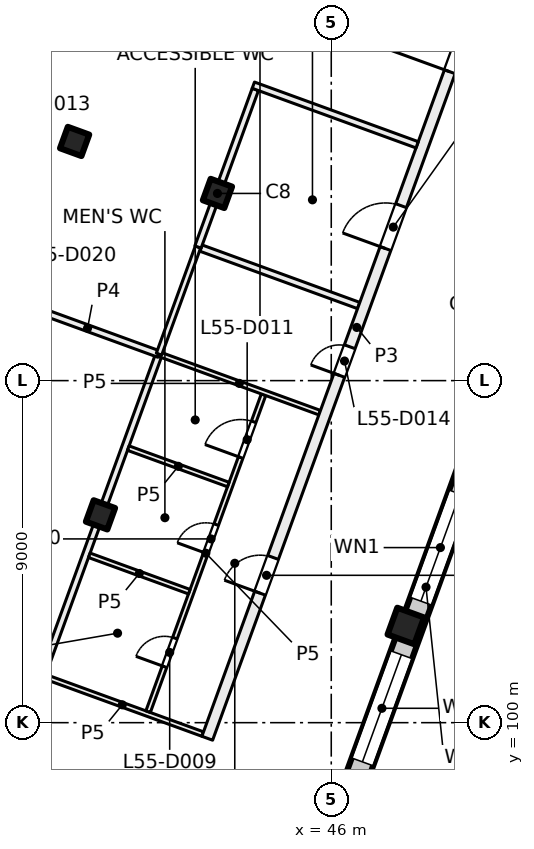
"""IFC4 building model, lengths in metres.
Left out: names, types, materials, properties, quantities, classifications, styles, units other than length and angle.
Written with IfcOpenShell. Run it as: python <this file> out.ifc"""

import sys

from ifc_helpers import new_model, si_unit, direction, frame, frame_2d, origin, origin_2d, place, context, subcontext, project, spatial, rectangle, extrude, element, fill, save


model = new_model("IFC4")
c1 = context("Model", 3, precision=1e-05, world=origin(), true_north=direction((0.0, 1.0)))
c2 = subcontext(c1, "Body", "Model", "MODEL_VIEW")
j1 = project(units=[si_unit("LENGTHUNIT", "METRE"), si_unit("PLANEANGLEUNIT", "RADIAN")], contexts=[c1])
p1 = place(None, origin())
s1 = spatial("IfcSite", under=j1, at=p1, CompositionType="ELEMENT")
p2 = place(p1, origin())
s2 = spatial("IfcBuilding", under=s1, at=p2, CompositionType="ELEMENT")
p3 = place(p2, frame((0.0, 0.0, 232.0)))
s3 = spatial("IfcBuildingStorey", under=s2, at=p3, CompositionType="ELEMENT", Elevation=232.0)
for number, where, z_axis, x_axis in (
    (1, (43.006, 113.925, 0.0), (0.0, 0.0, 1.0), (-0.342, -0.94, 0.0)),
    (2, (39.927, 105.468, 0.0), (0.0, 0.0, 1.0), (-0.342, -0.94, 0.0)),
    (3, (39.247, 115.293, 0.0), (0.0, 0.0, 1.0), (-0.342, -0.94, 0.0)),
):
    element("IfcColumn", number, at=place(p3, frame(where, z_axis=z_axis, x_axis=x_axis)), inside=s3, PredefinedType="COLUMN", context=c2, shape_type="SweptSolid", body=[
        extrude(rectangle(XDim=0.6, YDim=0.6, at=origin_2d()), origin(), (0.0, 0.0, 1.0), 4.0),
    ])
p4 = place(p3, frame((47.962, 102.544, 0.0), z_axis=(0.0, 0.0, 1.0), x_axis=(-0.342020143326, -0.939692620786, 0.0)))
e4 = element("IfcColumn", 4, at=p4, inside=s3, PredefinedType="COLUMN", context=c2, shape_type="SweptSolid", body=[
    extrude(rectangle(XDim=0.75, YDim=0.75, at=origin_2d()), origin(), (0.0, 0.0, 1.0), 4.0),
])
p5 = place(p3, frame((52.212, 113.783, 0.0), z_axis=(0.0, 0.0, 1.0), x_axis=(-0.34202521188, -0.939690775968, 0.0)))
e5 = element("IfcWall", 5, at=p5, inside=s3, PredefinedType="SOLIDWALL", context=c2, shape_type="SweptSolid", body=[
    extrude(rectangle(XDim=21.745, YDim=0.6, at=frame_2d((10.873, 0.0))), origin(), (0.0, 0.0, 1.0), 3.625),
])
p6 = place(p5, frame((3.765, 0.0, 0.9)))
e6 = element("IfcOpeningElement", 6, at=p6, cuts=e5, PredefinedType="OPENING", context=c2, shape_type="SweptSolid", body=[
    extrude(rectangle(XDim=3.0, YDim=2.4, at=frame_2d((1.5, 1.2))), frame((0.0, 0.31, 0.0), z_axis=(0.0, -1.0, 0.0), x_axis=(1.0, 0.0, 0.0)), (0.0, 0.0, 1.0), 0.62),
])
p7 = place(p5, frame((8.265, 0.0, 0.9)))
e7 = element("IfcOpeningElement", 7, at=p7, cuts=e5, PredefinedType="OPENING", context=c2, shape_type="SweptSolid", body=[
    extrude(rectangle(XDim=3.0, YDim=2.4, at=frame_2d((1.5, 1.2))), frame((0.0, 0.31, 0.0), z_axis=(0.0, -1.0, 0.0), x_axis=(1.0, 0.0, 0.0)), (0.0, 0.0, 1.0), 0.62),
])
p8 = place(p5, frame((12.765, 0.0, 0.9)))
e8 = element("IfcOpeningElement", 8, at=p8, cuts=e5, PredefinedType="OPENING", context=c2, shape_type="SweptSolid", body=[
    extrude(rectangle(XDim=3.0, YDim=2.4, at=frame_2d((1.5, 1.2))), frame((0.0, 0.31, 0.0), z_axis=(0.0, -1.0, 0.0), x_axis=(1.0, 0.0, 0.0)), (0.0, 0.0, 1.0), 0.62),
])
p9 = place(p5, frame((17.265, 0.0, 0.9)))
e9 = element("IfcOpeningElement", 9, at=p9, cuts=e5, PredefinedType="OPENING", context=c2, shape_type="SweptSolid", body=[
    extrude(rectangle(XDim=3.0, YDim=2.4, at=frame_2d((1.5, 1.2))), frame((0.0, 0.31, 0.0), z_axis=(0.0, -1.0, 0.0), x_axis=(1.0, 0.0, 0.0)), (0.0, 0.0, 1.0), 0.62),
])
p10 = place(p3, frame((38.385, 101.24, 0.0), z_axis=(0.0, 0.0, 1.0), x_axis=(0.939711088937, -0.341969398235, 0.0)))
e10 = element("IfcWall", 10, at=p10, inside=s3, PredefinedType="PARTITIONING", context=c2, shape_type="SweptSolid", body=[
    extrude(rectangle(XDim=4.503, YDim=0.125, at=frame_2d((2.252, 0.0))), origin(), (0.0, 0.0, 1.0), 3.625),
])
p11 = place(p3, frame((38.418, 101.322, 0.0), z_axis=(0.0, 0.0, 1.0), x_axis=(0.342101536507, 0.939662992099, 0.0)))
e11 = element("IfcWall", 11, at=p11, inside=s3, PredefinedType="PARTITIONING", context=c2, shape_type="SweptSolid", body=[
    extrude(rectangle(XDim=8.913, YDim=0.175, at=frame_2d((4.457, 0.0))), origin(), (0.0, 0.0, 1.0), 3.625),
])
p12 = place(p3, frame((41.181, 100.29, 0.0), z_axis=(0.0, 0.0, 1.0), x_axis=(0.34222012082, 0.939619810831, 0.0)))
e12 = element("IfcWall", 12, at=p12, inside=s3, PredefinedType="PARTITIONING", context=c2, shape_type="SweptSolid", body=[
    extrude(rectangle(XDim=8.875, YDim=0.125, at=frame_2d((4.438, 0.0))), origin(), (0.0, 0.0, 1.0), 3.625),
])
p13 = place(p12, frame((1.258, 0.0, 0.0)))
e13 = element("IfcOpeningElement", 13, at=p13, cuts=e12, PredefinedType="OPENING", context=c2, shape_type="SweptSolid", body=[
    extrude(rectangle(XDim=0.8, YDim=2.1, at=frame_2d((0.4, 1.05))), frame((0.0, 0.073, 0.0), z_axis=(0.0, -1.0, 0.0), x_axis=(1.0, 0.0, 0.0)), (0.0, 0.0, 1.0), 0.145),
])
p14 = place(p12, frame((4.437, 0.0, 0.0)))
e14 = element("IfcOpeningElement", 14, at=p14, cuts=e12, PredefinedType="OPENING", context=c2, shape_type="SweptSolid", body=[
    extrude(rectangle(XDim=0.8, YDim=2.1, at=frame_2d((0.4, 1.05))), frame((0.0, 0.073, 0.0), z_axis=(0.0, -1.0, 0.0), x_axis=(1.0, 0.0, 0.0)), (0.0, 0.0, 1.0), 0.145),
])
p15 = place(p12, frame((7.116, 0.0, 0.0)))
e15 = element("IfcOpeningElement", 15, at=p15, cuts=e12, PredefinedType="OPENING", context=c2, shape_type="SweptSolid", body=[
    extrude(rectangle(XDim=1.0, YDim=2.1, at=frame_2d((0.5, 1.05))), frame((0.0, 0.073, 0.0), z_axis=(0.0, -1.0, 0.0), x_axis=(1.0, 0.0, 0.0)), (0.0, 0.0, 1.0), 0.145),
])
p16 = place(p3, frame((41.467, 109.697, 0.0), z_axis=(0.0, 0.0, 1.0), x_axis=(-0.939713209288, 0.341963571582, 0.0)))
e16 = element("IfcWall", 16, at=p16, inside=s3, PredefinedType="PARTITIONING", context=c2, shape_type="SweptSolid", body=[
    extrude(rectangle(XDim=4.0, YDim=0.175, at=frame_2d((2.0, 0.0))), origin(), (0.0, 0.0, 1.0), 3.625),
])
p17 = place(p3, frame((41.467, 109.697, 0.0), z_axis=(0.0, 0.0, 1.0), x_axis=(0.939609529273, -0.342248349154, 0.0)))
e17 = element("IfcWall", 17, at=p17, inside=s3, PredefinedType="PARTITIONING", context=c2, shape_type="SweptSolid", body=[
    extrude(rectangle(XDim=4.5, YDim=0.125, at=frame_2d((2.25, 0.0))), origin(), (0.0, 0.0, 1.0), 3.625),
])
p18 = place(p3, frame((42.264, 103.446, 0.0), z_axis=(0.0, 0.0, 1.0), x_axis=(-0.939640574808, 0.342163104635, 0.0)))
e18 = element("IfcWall", 18, at=p18, inside=s3, PredefinedType="PARTITIONING", context=c2, shape_type="SweptSolid", body=[
    extrude(rectangle(XDim=2.8, YDim=0.125, at=frame_2d((1.4, 0.0))), origin(), (0.0, 0.0, 1.0), 3.625),
])
p19 = place(p3, frame((42.493, 112.516, 0.0), z_axis=(0.0, 0.0, 1.0), x_axis=(-0.341965219194, -0.939712609717, 0.0)))
e19 = element("IfcWall", 19, at=p19, inside=s3, PredefinedType="PARTITIONING", context=c2, shape_type="SweptSolid", body=[
    extrude(rectangle(XDim=3.0, YDim=0.15, at=frame_2d((1.5, 0.0))), origin(), (0.0, 0.0, 1.0), 3.625),
])
p20 = place(p3, frame((42.575, 112.486, 0.0), z_axis=(0.0, 0.0, 1.0), x_axis=(0.939620446327, -0.342218375959, 0.0)))
e20 = element("IfcWall", 20, at=p20, inside=s3, PredefinedType="PARTITIONING", context=c2, shape_type="SweptSolid", body=[
    extrude(rectangle(XDim=4.412, YDim=0.175, at=frame_2d((2.206, 0.0))), origin(), (0.0, 0.0, 1.0), 3.625),
])
p21 = place(p3, frame((42.737, 99.59, 0.0), z_axis=(0.0, 0.0, 1.0), x_axis=(0.341992703977, 0.939702607438, 0.0)))
e21 = element("IfcWall", 21, at=p21, inside=s3, PredefinedType="PARTITIONING", context=c2, shape_type="SweptSolid", body=[
    extrude(rectangle(XDim=23.006, YDim=0.3, at=frame_2d((11.503, 0.0))), origin(), (0.0, 0.0, 1.0), 3.625),
])
p22 = place(p21, frame((4.062, 0.0, 0.0)))
e22 = element("IfcOpeningElement", 22, at=p22, cuts=e21, PredefinedType="OPENING", context=c2, shape_type="SweptSolid", body=[
    extrude(rectangle(XDim=1.0, YDim=2.1, at=frame_2d((0.5, 1.05))), frame((0.0, 0.16, 0.0), z_axis=(0.0, -1.0, 0.0), x_axis=(1.0, 0.0, 0.0)), (0.0, 0.0, 1.0), 0.32),
])
p23 = place(p21, frame((10.162, 0.0, 0.0)))
e23 = element("IfcOpeningElement", 23, at=p23, cuts=e21, PredefinedType="OPENING", context=c2, shape_type="SweptSolid", body=[
    extrude(rectangle(XDim=0.8, YDim=2.1, at=frame_2d((0.4, 1.05))), frame((0.0, 0.16, 0.0), z_axis=(0.0, -1.0, 0.0), x_axis=(1.0, 0.0, 0.0)), (0.0, 0.0, 1.0), 0.32),
])
p24 = place(p21, frame((13.712, 0.0, 0.0)))
e24 = element("IfcOpeningElement", 24, at=p24, cuts=e21, PredefinedType="OPENING", context=c2, shape_type="SweptSolid", body=[
    extrude(rectangle(XDim=1.2, YDim=2.1, at=frame_2d((0.6, 1.05))), frame((0.0, 0.16, 0.0), z_axis=(0.0, -1.0, 0.0), x_axis=(1.0, 0.0, 0.0)), (0.0, 0.0, 1.0), 0.32),
])
p25 = place(p21, frame((18.662, 0.0, 0.0)))
e25 = element("IfcOpeningElement", 25, at=p25, cuts=e21, PredefinedType="OPENING", context=c2, shape_type="SweptSolid", body=[
    extrude(rectangle(XDim=1.8, YDim=2.1, at=frame_2d((0.9, 1.05))), frame((0.0, 0.16, 0.0), z_axis=(0.0, -1.0, 0.0), x_axis=(1.0, 0.0, 0.0)), (0.0, 0.0, 1.0), 0.32),
])
p26 = place(p3, frame((43.29, 106.266, 0.0), z_axis=(0.0, 0.0, 1.0), x_axis=(-0.939650782256, 0.342135071873, 0.0)))
e26 = element("IfcWall", 26, at=p26, inside=s3, PredefinedType="PARTITIONING", context=c2, shape_type="SweptSolid", body=[
    extrude(rectangle(XDim=2.8, YDim=0.125, at=frame_2d((1.4, 0.0))), origin(), (0.0, 0.0, 1.0), 3.625),
])
p27 = place(p3, frame((44.002, 116.662, 0.0), z_axis=(0.0, 0.0, 1.0), x_axis=(-0.342022951975, -0.939691598517, 0.0)))
e27 = element("IfcWall", 27, at=p27, inside=s3, PredefinedType="PARTITIONING", context=c2, shape_type="SweptSolid", body=[
    extrude(rectangle(XDim=4.412, YDim=0.175, at=frame_2d((2.206, 0.0))), origin(), (0.0, 0.0, 1.0), 3.625),
])
p28 = place(p3, frame((48.26, 115.205, 0.0), z_axis=(0.0, 0.0, 1.0), x_axis=(-0.939684589011, 0.34204220964, 0.0)))
e28 = element("IfcWall", 28, at=p28, inside=s3, PredefinedType="PARTITIONING", context=c2, shape_type="SweptSolid", body=[
    extrude(rectangle(XDim=4.587, YDim=0.175, at=frame_2d((2.293, 0.0))), origin(), (0.0, 0.0, 1.0), 3.625),
])
p29 = place(p7, origin())
e29 = element("IfcWindow", 29, at=p29, inside=s3, PartitioningType="SINGLE_PANEL", PredefinedType="WINDOW", context=c2, shape_type="SweptSolid", body=[
    extrude(rectangle(XDim=3.0, YDim=2.4, at=frame_2d((1.5, 1.2))), frame((0.0, 0.03, 0.0), z_axis=(0.0, -1.0, 0.0), x_axis=(1.0, 0.0, 0.0)), (0.0, 0.0, 1.0), 0.06),
])
fill(e7, e29)
p30 = place(p8, origin())
e30 = element("IfcWindow", 30, at=p30, inside=s3, PartitioningType="SINGLE_PANEL", PredefinedType="WINDOW", context=c2, shape_type="SweptSolid", body=[
    extrude(rectangle(XDim=3.0, YDim=2.4, at=frame_2d((1.5, 1.2))), frame((0.0, 0.03, 0.0), z_axis=(0.0, -1.0, 0.0), x_axis=(1.0, 0.0, 0.0)), (0.0, 0.0, 1.0), 0.06),
])
fill(e8, e30)
p31 = place(p22, origin())
e31 = element("IfcDoor", 31, at=p31, inside=s3, OperationType="SINGLE_SWING_LEFT", PredefinedType="DOOR", context=c2, shape_type="SweptSolid", body=[
    extrude(rectangle(XDim=1.0, YDim=2.1, at=frame_2d((0.5, 1.05))), frame((0.0, 0.025, 0.0), z_axis=(0.0, -1.0, 0.0), x_axis=(1.0, 0.0, 0.0)), (0.0, 0.0, 1.0), 0.05),
])
fill(e22, e31)
p32 = place(p13, origin())
e32 = element("IfcDoor", 32, at=p32, inside=s3, OperationType="SINGLE_SWING_LEFT", PredefinedType="DOOR", context=c2, shape_type="SweptSolid", body=[
    extrude(rectangle(XDim=0.8, YDim=2.1, at=frame_2d((0.4, 1.05))), frame((0.0, 0.025, 0.0), z_axis=(0.0, -1.0, 0.0), x_axis=(1.0, 0.0, 0.0)), (0.0, 0.0, 1.0), 0.05),
])
fill(e13, e32)
p33 = place(p14, origin())
e33 = element("IfcDoor", 33, at=p33, inside=s3, OperationType="SINGLE_SWING_LEFT", PredefinedType="DOOR", context=c2, shape_type="SweptSolid", body=[
    extrude(rectangle(XDim=0.8, YDim=2.1, at=frame_2d((0.4, 1.05))), frame((0.0, 0.025, 0.0), z_axis=(0.0, -1.0, 0.0), x_axis=(1.0, 0.0, 0.0)), (0.0, 0.0, 1.0), 0.05),
])
fill(e14, e33)
p34 = place(p15, origin())
e34 = element("IfcDoor", 34, at=p34, inside=s3, OperationType="SINGLE_SWING_LEFT", PredefinedType="DOOR", context=c2, shape_type="SweptSolid", body=[
    extrude(rectangle(XDim=1.0, YDim=2.1, at=frame_2d((0.5, 1.05))), frame((0.0, 0.025, 0.0), z_axis=(0.0, -1.0, 0.0), x_axis=(1.0, 0.0, 0.0)), (0.0, 0.0, 1.0), 0.05),
])
fill(e15, e34)
p35 = place(p23, origin())
e35 = element("IfcDoor", 35, at=p35, inside=s3, OperationType="SINGLE_SWING_RIGHT", PredefinedType="DOOR", context=c2, shape_type="SweptSolid", body=[
    extrude(rectangle(XDim=0.8, YDim=2.1, at=frame_2d((0.4, 1.05))), frame((0.0, 0.025, 0.0), z_axis=(0.0, -1.0, 0.0), x_axis=(1.0, 0.0, 0.0)), (0.0, 0.0, 1.0), 0.05),
])
fill(e23, e35)
p36 = place(p24, origin())
e36 = element("IfcDoor", 36, at=p36, inside=s3, OperationType="DOUBLE_DOOR_SINGLE_SWING", PredefinedType="DOOR", context=c2, shape_type="SweptSolid", body=[
    extrude(rectangle(XDim=1.2, YDim=2.1, at=frame_2d((0.6, 1.05))), frame((0.0, 0.025, 0.0), z_axis=(0.0, -1.0, 0.0), x_axis=(1.0, 0.0, 0.0)), (0.0, 0.0, 1.0), 0.05),
])
fill(e24, e36)
p37 = place(p25, origin())
e37 = element("IfcDoor", 37, at=p37, inside=s3, OperationType="DOUBLE_DOOR_SINGLE_SWING", PredefinedType="DOOR", context=c2, shape_type="SweptSolid", body=[
    extrude(rectangle(XDim=1.8, YDim=2.1, at=frame_2d((0.9, 1.05))), frame((0.0, 0.025, 0.0), z_axis=(0.0, -1.0, 0.0), x_axis=(1.0, 0.0, 0.0)), (0.0, 0.0, 1.0), 0.05),
])
fill(e25, e37)
save(model, sys.argv[1])
